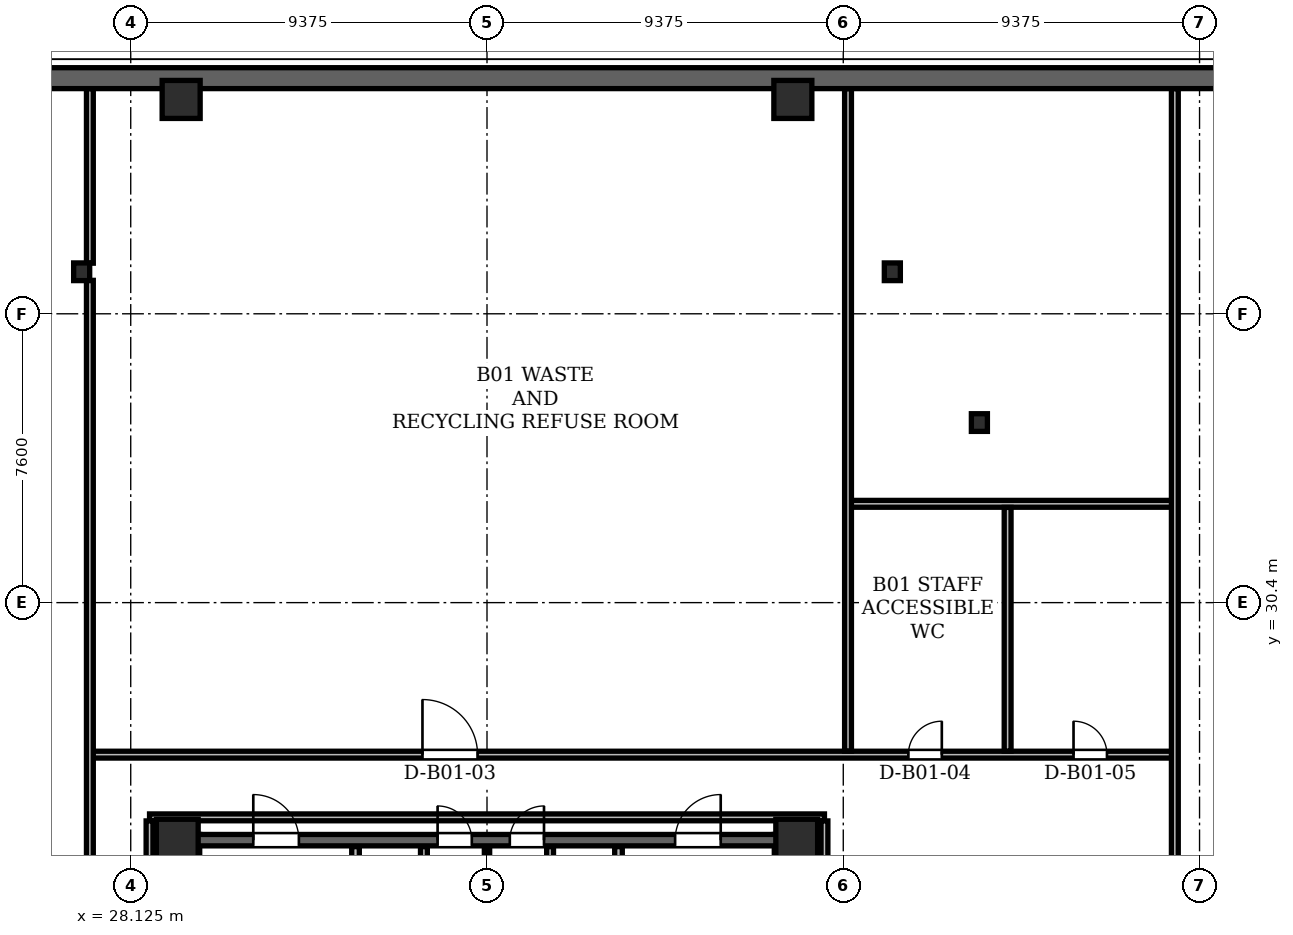
"""IFC4 building model, lengths in metres.
Left out: names, types, materials, properties, quantities, classifications, styles, units other than length and angle.
Written with IfcOpenShell. Run it as: python <this file> out.ifc"""

import sys

from ifc_helpers import new_model, si_unit, direction, frame, frame_2d, origin, origin_2d, place, context, subcontext, project, spatial, rectangle, hollow_rectangle, i_section, extrude, element, fill, save


model = new_model("IFC4")
c1 = context("Model", 3, precision=1e-05, world=origin(), true_north=direction((0.0, 1.0)))
c2 = subcontext(c1, "Body", "Model", "MODEL_VIEW")
j1 = project(units=[si_unit("LENGTHUNIT", "METRE"), si_unit("PLANEANGLEUNIT", "RADIAN")], contexts=[c1])
p1 = place(None, origin())
s1 = spatial("IfcSite", under=j1, at=p1, CompositionType="ELEMENT")
p2 = place(p1, origin())
s2 = spatial("IfcBuilding", under=s1, at=p2, CompositionType="ELEMENT")
p3 = place(p2, frame((0.0, 0.0, -4.0)))
s3 = spatial("IfcBuildingStorey", under=s2, at=p3, CompositionType="ELEMENT", Elevation=-4.0)
for number, where, z_axis, x_axis in (
    (1, (45.65, 24.15, 0.0), (0.0, 0.0, 1.0), (1.0, 0.0, 0.0)),
    (2, (29.35, 24.15, 0.0), (0.0, 0.0, 1.0), (1.0, 0.0, 0.0)),
):
    element("IfcColumn", number, at=place(p3, frame(where, z_axis=z_axis, x_axis=x_axis)), inside=s3, PredefinedType="COLUMN", context=c2, shape_type="SweptSolid", body=[
        extrude(hollow_rectangle(XDim=1.1, YDim=1.1, WallThickness=0.09, at=origin_2d()), origin(), (0.0, 0.0, 1.0), 4.0),
    ])
for number, where, z_axis, x_axis in (
    (3, (45.548, 43.64, 0.004), (0.0, 0.0, 1.0), (1.0, 0.0, 0.0)),
    (4, (29.452, 43.64, 0.004), (0.0, 0.0, 1.0), (1.0, 0.0, 0.0)),
):
    element("IfcColumn", number, at=place(p3, frame(where, z_axis=z_axis, x_axis=x_axis)), inside=s3, PredefinedType="COLUMN", context=c2, shape_type="SweptSolid", body=[
        extrude(hollow_rectangle(XDim=1.0, YDim=1.0, WallThickness=0.085, at=origin_2d()), origin(), (0.0, 0.0, 1.0), 3.991),
    ])
for number, where, z_axis, x_axis in (
    (5, (50.457, 35.138, 0.004), (0.0, 0.0, 1.0), (1.0, 0.0, 0.0)),
    (6, (48.166, 39.106, 0.004), (0.0, 0.0, 1.0), (1.0, 0.0, 0.0)),
    (7, (26.834, 39.106, 0.004), (0.0, 0.0, 1.0), (1.0, 0.0, 0.0)),
):
    element("IfcColumn", number, at=place(p3, frame(where, z_axis=z_axis, x_axis=x_axis)), inside=s3, PredefinedType="COLUMN", context=c2, shape_type="SweptSolid", body=[
        extrude(i_section(OverallWidth=0.422, OverallDepth=0.465, WebThickness=0.045, FlangeThickness=0.072, at=origin_2d()), origin(), (0.0, 0.0, 1.0), 3.991),
    ])
for number, where, z_axis, x_axis in (
    (8, (29.64, 11.0, 0.0), (0.0, 0.0, 1.0), (0.0, 1.0, 0.0)),
    (9, (45.36, 11.0, 0.0), (0.0, 0.0, 1.0), (0.0, 1.0, 0.0)),
):
    element("IfcWall", number, at=place(p3, frame(where, z_axis=z_axis, x_axis=x_axis)), inside=s3, PredefinedType="SHEAR", context=c2, shape_type="SweptSolid", body=[
        extrude(rectangle(XDim=13.3, YDim=0.6, at=frame_2d((6.65, 0.0))), origin(), (0.0, 0.0, 1.0), 3.68),
    ])
p4 = place(p3, frame((29.65, 24.15, 0.0), z_axis=(0.0, 0.0, 1.0), x_axis=(1.0, 0.0, 0.0)))
e10 = element("IfcWall", 10, at=p4, inside=s3, PredefinedType="SHEAR", context=c2, shape_type="SweptSolid", body=[
    extrude(rectangle(XDim=15.7, YDim=0.3, at=frame_2d((7.85, 0.0))), origin(), (0.0, 0.0, 1.0), 3.68),
])
p5 = place(p4, frame((1.7, 0.0, 0.0)))
e11 = element("IfcOpeningElement", 11, at=p5, cuts=e10, PredefinedType="OPENING", context=c2, shape_type="SweptSolid", body=[
    extrude(rectangle(XDim=1.2, YDim=2.2, at=frame_2d((0.6, 1.1))), frame((0.0, 0.15, 0.0), z_axis=(0.0, -1.0, 0.0), x_axis=(1.0, 0.0, 0.0)), (0.0, 0.0, 1.0), 0.3),
])
p6 = place(p4, frame((12.8, 0.0, 0.0)))
e12 = element("IfcOpeningElement", 12, at=p6, cuts=e10, PredefinedType="OPENING", context=c2, shape_type="SweptSolid", body=[
    extrude(rectangle(XDim=1.2, YDim=2.2, at=frame_2d((0.6, 1.1))), frame((0.0, 0.15, 0.0), z_axis=(0.0, -1.0, 0.0), x_axis=(1.0, 0.0, 0.0)), (0.0, 0.0, 1.0), 0.3),
])
p7 = place(p4, frame((6.55, 0.0, 0.0)))
e13 = element("IfcOpeningElement", 13, at=p7, cuts=e10, PredefinedType="OPENING", context=c2, shape_type="SweptSolid", body=[
    extrude(rectangle(XDim=0.9, YDim=2.05, at=frame_2d((0.45, 1.025))), frame((0.0, 0.15, 0.0), z_axis=(0.0, -1.0, 0.0), x_axis=(1.0, 0.0, 0.0)), (0.0, 0.0, 1.0), 0.3),
])
p8 = place(p4, frame((8.45, 0.0, 0.0)))
e14 = element("IfcOpeningElement", 14, at=p8, cuts=e10, PredefinedType="OPENING", context=c2, shape_type="SweptSolid", body=[
    extrude(rectangle(XDim=0.9, YDim=2.05, at=frame_2d((0.45, 1.025))), frame((0.0, 0.15, 0.0), z_axis=(0.0, -1.0, 0.0), x_axis=(1.0, 0.0, 0.0)), (0.0, 0.0, 1.0), 0.3),
])
p9 = place(p3, frame((76.093, 44.2, 0.0), z_axis=(0.0, 0.0, 1.0), x_axis=(-1.0, 0.0, 0.0)))
e15 = element("IfcWall", 15, at=p9, inside=s3, PredefinedType="USERDEFINED", context=c2, shape_type="SweptSolid", body=[
    extrude(rectangle(XDim=77.186, YDim=0.55, at=frame_2d((38.593, 0.0))), origin(), (0.0, 0.0, 1.0), 3.68),
])
p10 = place(p3, frame((34.04, 19.48, 0.0), z_axis=(0.0, 0.0, 1.0), x_axis=(0.0, 1.0, 0.0)))
e16 = element("IfcWall", 16, at=p10, inside=s3, PredefinedType="PARTITIONING", context=c2, shape_type="SweptSolid", body=[
    extrude(rectangle(XDim=4.5, YDim=0.2, at=frame_2d((2.25, 0.0))), origin(), (0.0, 0.0, 1.0), 2.72),
])
p11 = place(p10, frame((2.12, 0.0, 0.0)))
e17 = element("IfcOpeningElement", 17, at=p11, cuts=e16, PredefinedType="OPENING", context=c2, shape_type="SweptSolid", body=[
    extrude(rectangle(XDim=1.1, YDim=2.2, at=frame_2d((0.55, 1.1))), frame((0.0, 0.1, 0.0), z_axis=(0.0, -1.0, 0.0), x_axis=(1.0, 0.0, 0.0)), (0.0, 0.0, 1.0), 0.2),
])
p12 = place(p3, frame((35.84, 20.96, 0.0), z_axis=(0.0, 0.0, 1.0), x_axis=(0.0, 1.0, 0.0)))
e18 = element("IfcWall", 18, at=p12, inside=s3, PredefinedType="PARTITIONING", context=c2, shape_type="SweptSolid", body=[
    extrude(rectangle(XDim=3.02, YDim=0.18, at=frame_2d((1.51, 0.0))), origin(), (0.0, 0.0, 1.0), 2.72),
])
p13 = place(p3, frame((40.96, 19.48, 0.0), z_axis=(0.0, 0.0, 1.0), x_axis=(0.0, 1.0, 0.0)))
e19 = element("IfcWall", 19, at=p13, inside=s3, PredefinedType="PARTITIONING", context=c2, shape_type="SweptSolid", body=[
    extrude(rectangle(XDim=4.5, YDim=0.2, at=frame_2d((2.25, 0.0))), origin(), (0.0, 0.0, 1.0), 2.72),
])
p14 = place(p13, frame((2.12, 0.0, 0.0)))
e20 = element("IfcOpeningElement", 20, at=p14, cuts=e19, PredefinedType="OPENING", context=c2, shape_type="SweptSolid", body=[
    extrude(rectangle(XDim=1.1, YDim=2.2, at=frame_2d((0.55, 1.1))), frame((0.0, 0.1, 0.0), z_axis=(0.0, -1.0, 0.0), x_axis=(1.0, 0.0, 0.0)), (0.0, 0.0, 1.0), 0.2),
])
p15 = place(p3, frame((39.16, 20.96, 0.0), z_axis=(0.0, 0.0, 1.0), x_axis=(0.0, 1.0, 0.0)))
e21 = element("IfcWall", 21, at=p15, inside=s3, PredefinedType="PARTITIONING", context=c2, shape_type="SweptSolid", body=[
    extrude(rectangle(XDim=3.02, YDim=0.18, at=frame_2d((1.51, 0.0))), origin(), (0.0, 0.0, 1.0), 2.72),
])
p16 = place(p3, frame((37.5, 21.06, 0.0), z_axis=(0.0, 0.0, 1.0), x_axis=(0.0, 1.0, 0.0)))
e22 = element("IfcWall", 22, at=p16, inside=s3, PredefinedType="PARTITIONING", context=c2, shape_type="SweptSolid", body=[
    extrude(rectangle(XDim=2.92, YDim=0.14, at=frame_2d((1.46, 0.0))), origin(), (0.0, 0.0, 1.0), 2.72),
])
p17 = place(p3, frame((28.62, 24.75, 0.0), z_axis=(0.0, 0.0, 1.0), x_axis=(1.0, 0.0, 0.0)))
e23 = element("IfcWall", 23, at=p17, inside=s3, PredefinedType="PARTITIONING", context=c2, shape_type="SweptSolid", body=[
    extrude(rectangle(XDim=17.76, YDim=0.18, at=frame_2d((8.88, 0.0))), origin(), (0.0, 0.0, 1.0), 2.743),
])
p18 = place(p3, frame((27.05, 26.4, 0.0), z_axis=(0.0, 0.0, 1.0), x_axis=(1.0, 0.0, 0.0)))
e24 = element("IfcWall", 24, at=p18, inside=s3, PredefinedType="PARTITIONING", context=c2, shape_type="SweptSolid", body=[
    extrude(rectangle(XDim=28.55, YDim=0.18, at=frame_2d((14.275, 0.0))), origin(), (0.0, 0.0, 1.0), 2.743),
])
p19 = place(p18, frame((8.752, 0.0, 0.0)))
e25 = element("IfcOpeningElement", 25, at=p19, cuts=e24, PredefinedType="OPENING", context=c2, shape_type="SweptSolid", body=[
    extrude(rectangle(XDim=1.45, YDim=2.25, at=frame_2d((0.725, 1.125))), frame((0.0, 0.09, 0.0), z_axis=(0.0, -1.0, 0.0), x_axis=(1.0, 0.0, 0.0)), (0.0, 0.0, 1.0), 0.18),
])
p20 = place(p18, frame((21.538, 0.0, 0.0)))
e26 = element("IfcOpeningElement", 26, at=p20, cuts=e24, PredefinedType="OPENING", context=c2, shape_type="SweptSolid", body=[
    extrude(rectangle(XDim=0.88, YDim=2.08, at=frame_2d((0.44, 1.04))), frame((0.0, 0.09, 0.0), z_axis=(0.0, -1.0, 0.0), x_axis=(1.0, 0.0, 0.0)), (0.0, 0.0, 1.0), 0.18),
])
p21 = place(p18, frame((25.884, 0.0, 0.0)))
e27 = element("IfcOpeningElement", 27, at=p21, cuts=e24, PredefinedType="OPENING", context=c2, shape_type="SweptSolid", body=[
    extrude(rectangle(XDim=0.88, YDim=2.08, at=frame_2d((0.44, 1.04))), frame((0.0, 0.09, 0.0), z_axis=(0.0, -1.0, 0.0), x_axis=(1.0, 0.0, 0.0)), (0.0, 0.0, 1.0), 0.18),
])
p22 = place(p3, frame((47.0, 33.0, 0.0), z_axis=(0.0, 0.0, 1.0), x_axis=(1.0, 0.0, 0.0)))
e28 = element("IfcWall", 28, at=p22, inside=s3, PredefinedType="PARTITIONING", context=c2, shape_type="SweptSolid", body=[
    extrude(rectangle(XDim=8.6, YDim=0.18, at=frame_2d((4.3, 0.0))), origin(), (0.0, 0.0, 1.0), 2.814),
])
p23 = place(p3, frame((27.05, 10.494, 0.0), z_axis=(0.0, 0.0, 1.0), x_axis=(0.0, 1.0, 0.0)))
e29 = element("IfcWall", 29, at=p23, inside=s3, PredefinedType="PARTITIONING", context=c2, shape_type="SweptSolid", body=[
    extrude(rectangle(XDim=28.386, YDim=0.18, at=frame_2d((14.193, 0.0))), origin(), (0.0, 0.0, 1.0), 2.743),
])
p24 = place(p23, frame((5.91, 0.0, 0.0)))
e30 = element("IfcOpeningElement", 30, at=p24, cuts=e29, PredefinedType="OPENING", context=c2, shape_type="SweptSolid", body=[
    extrude(rectangle(XDim=1.45, YDim=2.25, at=frame_2d((0.725, 1.125))), frame((0.0, 0.09, 0.0), z_axis=(0.0, -1.0, 0.0), x_axis=(1.0, 0.0, 0.0)), (0.0, 0.0, 1.0), 0.18),
])
p25 = place(p3, frame((27.05, 39.332, 0.0), z_axis=(0.0, 0.0, 1.0), x_axis=(0.0, 1.0, 0.0)))
e31 = element("IfcWall", 31, at=p25, inside=s3, PredefinedType="PARTITIONING", context=c2, shape_type="SweptSolid", body=[
    extrude(rectangle(XDim=4.589, YDim=0.18, at=frame_2d((2.295, 0.0))), origin(), (0.0, 0.0, 1.0), 2.814),
])
for number, where, z_axis, x_axis in (
    (32, (28.62, 10.494, 0.0), (0.0, 0.0, 1.0), (0.0, 1.0, 0.0)),
    (33, (46.38, 10.494, 0.0), (0.0, 0.0, 1.0), (0.0, 1.0, 0.0)),
):
    element("IfcWall", number, at=place(p3, frame(where, z_axis=z_axis, x_axis=x_axis)), inside=s3, PredefinedType="PARTITIONING", context=c2, shape_type="SweptSolid", body=[
        extrude(rectangle(XDim=14.162, YDim=0.18, at=frame_2d((7.081, 0.0))), origin(), (0.0, 0.0, 1.0), 2.743),
    ])
p26 = place(p3, frame((47.0, 26.494, 0.0), z_axis=(0.0, 0.0, 1.0), x_axis=(0.0, 1.0, 0.0)))
e34 = element("IfcWall", 34, at=p26, inside=s3, PredefinedType="PARTITIONING", context=c2, shape_type="SweptSolid", body=[
    extrude(rectangle(XDim=17.427, YDim=0.18, at=frame_2d((8.713, 0.0))), origin(), (0.0, 0.0, 1.0), 2.814),
])
p27 = place(p3, frame((51.2, 26.494, 0.0), z_axis=(0.0, 0.0, 1.0), x_axis=(0.0, 1.0, 0.0)))
e35 = element("IfcWall", 35, at=p27, inside=s3, PredefinedType="PARTITIONING", context=c2, shape_type="SweptSolid", body=[
    extrude(rectangle(XDim=6.412, YDim=0.18, at=frame_2d((3.206, 0.0))), origin(), (0.0, 0.0, 1.0), 3.68),
])
p28 = place(p3, frame((55.6, 1.679, 0.0), z_axis=(0.0, 0.0, 1.0), x_axis=(0.0, 1.0, 0.0)))
e36 = element("IfcWall", 36, at=p28, inside=s3, PredefinedType="PARTITIONING", context=c2, shape_type="SweptSolid", body=[
    extrude(rectangle(XDim=42.242, YDim=0.18, at=frame_2d((21.121, 0.0))), origin(), (0.0, 0.0, 1.0), 2.47),
])
p29 = place(p28, frame((14.725, 0.0, 0.0)))
e37 = element("IfcOpeningElement", 37, at=p29, cuts=e36, PredefinedType="OPENING", context=c2, shape_type="SweptSolid", body=[
    extrude(rectangle(XDim=1.45, YDim=2.25, at=frame_2d((0.725, 1.125))), frame((0.0, 0.09, 0.0), z_axis=(0.0, -1.0, 0.0), x_axis=(1.0, 0.0, 0.0)), (0.0, 0.0, 1.0), 0.18),
])
p30 = place(p5, origin())
e38 = element("IfcDoor", 38, at=p30, inside=s3, OperationType="SINGLE_SWING_LEFT", PredefinedType="DOOR", context=c2, shape_type="SweptSolid", body=[
    extrude(rectangle(XDim=1.2, YDim=2.2, at=frame_2d((0.6, 1.1))), frame((0.0, 0.025, 0.0), z_axis=(0.0, -1.0, 0.0), x_axis=(1.0, 0.0, 0.0)), (0.0, 0.0, 1.0), 0.05),
])
fill(e11, e38)
p31 = place(p6, origin())
e39 = element("IfcDoor", 39, at=p31, inside=s3, OperationType="SINGLE_SWING_RIGHT", PredefinedType="DOOR", context=c2, shape_type="SweptSolid", body=[
    extrude(rectangle(XDim=1.2, YDim=2.2, at=frame_2d((0.6, 1.1))), frame((0.0, 0.025, 0.0), z_axis=(0.0, -1.0, 0.0), x_axis=(1.0, 0.0, 0.0)), (0.0, 0.0, 1.0), 0.05),
])
fill(e12, e39)
p32 = place(p7, origin())
e40 = element("IfcDoor", 40, at=p32, inside=s3, OperationType="SINGLE_SWING_LEFT", PredefinedType="DOOR", context=c2, shape_type="SweptSolid", body=[
    extrude(rectangle(XDim=0.9, YDim=2.05, at=frame_2d((0.45, 1.025))), frame((0.0, 0.025, 0.0), z_axis=(0.0, -1.0, 0.0), x_axis=(1.0, 0.0, 0.0)), (0.0, 0.0, 1.0), 0.05),
])
fill(e13, e40)
p33 = place(p8, origin())
e41 = element("IfcDoor", 41, at=p33, inside=s3, OperationType="SINGLE_SWING_RIGHT", PredefinedType="DOOR", context=c2, shape_type="SweptSolid", body=[
    extrude(rectangle(XDim=0.9, YDim=2.05, at=frame_2d((0.45, 1.025))), frame((0.0, 0.025, 0.0), z_axis=(0.0, -1.0, 0.0), x_axis=(1.0, 0.0, 0.0)), (0.0, 0.0, 1.0), 0.05),
])
fill(e14, e41)
p34 = place(p19, origin())
e42 = element("IfcDoor", 42, at=p34, inside=s3, OperationType="SINGLE_SWING_LEFT", PredefinedType="DOOR", context=c2, shape_type="SweptSolid", body=[
    extrude(rectangle(XDim=1.45, YDim=2.25, at=frame_2d((0.725, 1.125))), frame((0.0, 0.025, 0.0), z_axis=(0.0, -1.0, 0.0), x_axis=(1.0, 0.0, 0.0)), (0.0, 0.0, 1.0), 0.05),
])
fill(e25, e42)
p35 = place(p20, origin())
e43 = element("IfcDoor", 43, at=p35, inside=s3, OperationType="SINGLE_SWING_RIGHT", PredefinedType="DOOR", context=c2, shape_type="SweptSolid", body=[
    extrude(rectangle(XDim=0.88, YDim=2.08, at=frame_2d((0.44, 1.04))), frame((0.0, 0.025, 0.0), z_axis=(0.0, -1.0, 0.0), x_axis=(1.0, 0.0, 0.0)), (0.0, 0.0, 1.0), 0.05),
])
fill(e26, e43)
p36 = place(p21, origin())
e44 = element("IfcDoor", 44, at=p36, inside=s3, OperationType="SINGLE_SWING_LEFT", PredefinedType="DOOR", context=c2, shape_type="SweptSolid", body=[
    extrude(rectangle(XDim=0.88, YDim=2.08, at=frame_2d((0.44, 1.04))), frame((0.0, 0.025, 0.0), z_axis=(0.0, -1.0, 0.0), x_axis=(1.0, 0.0, 0.0)), (0.0, 0.0, 1.0), 0.05),
])
fill(e27, e44)
save(model, sys.argv[1])
